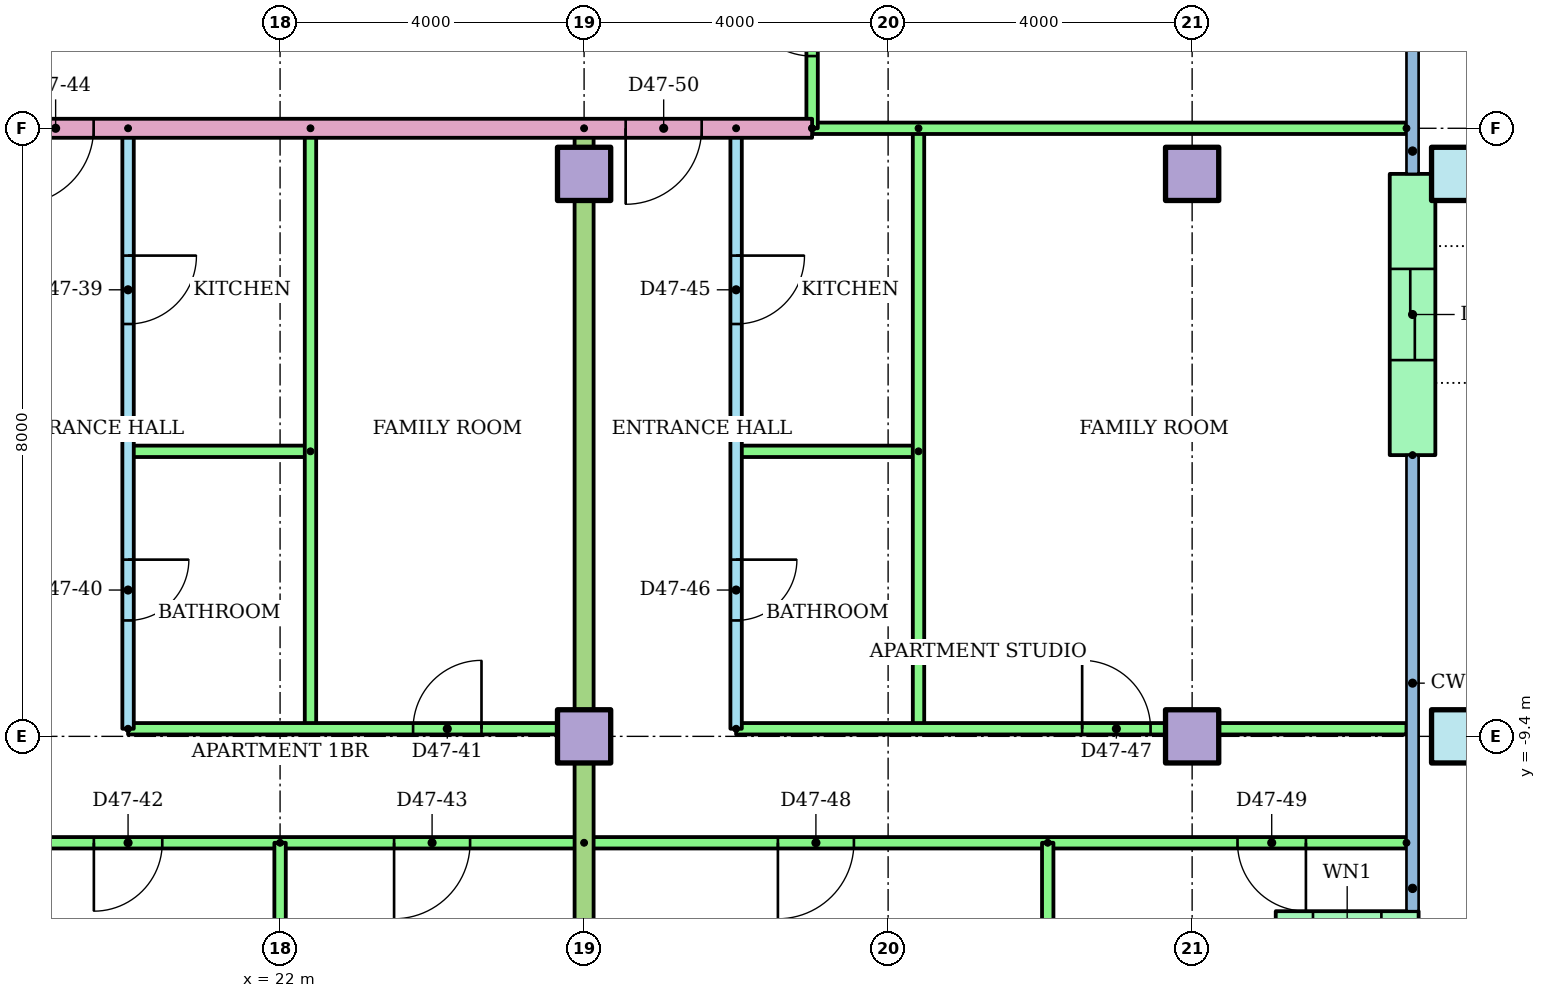
"""IFC4 building model, lengths in metres.
Left out: names, types, materials, properties, quantities, classifications, styles, units other than length and angle.
Written with IfcOpenShell. Run it as: python <this file> out.ifc"""

import sys

from ifc_helpers import new_model, si_unit, direction, frame, frame_2d, origin, origin_2d, place, context, subcontext, project, spatial, rectangle, hollow_rectangle, extrude, element, fill, save


model = new_model("IFC4")
c1 = context("Model", 3, precision=1e-05, world=origin(), true_north=direction((0.0, 1.0)))
c2 = subcontext(c1, "Body", "Model", "MODEL_VIEW")
j1 = project(units=[si_unit("LENGTHUNIT", "METRE"), si_unit("PLANEANGLEUNIT", "RADIAN")], contexts=[c1])
p1 = place(None, origin())
s1 = spatial("IfcSite", under=j1, at=p1, CompositionType="ELEMENT")
p2 = place(p1, origin())
s2 = spatial("IfcBuilding", under=s1, at=p2, CompositionType="ELEMENT")
p3 = place(p2, frame((0.0, 0.0, 181.3)))
s3 = spatial("IfcBuildingStorey", under=s2, at=p3, CompositionType="ELEMENT", Elevation=181.3)
for number, where in (
    (1, (26.0, -9.4, 0.0)),
    (2, (34.0, -9.4, 0.0)),
):
    element("IfcColumn", number, at=place(p3, frame(where)), inside=s3, PredefinedType="COLUMN", context=c2, shape_type="SweptSolid", body=[
        extrude(rectangle(XDim=0.7, YDim=0.7, at=origin_2d()), origin(), (0.0, 0.0, 1.0), 3.2),
    ])
p4 = place(p3, frame((37.5, -9.4, 0.0)))
e3 = element("IfcColumn", 3, at=p4, inside=s3, PredefinedType="COLUMN", context=c2, shape_type="SweptSolid", body=[
    extrude(hollow_rectangle(XDim=0.7, YDim=0.7, WallThickness=0.036, at=origin_2d()), origin(), (0.0, 0.0, 1.0), 3.2),
])
for number, where in (
    (4, (26.0, -2.0, 0.0)),
    (5, (34.0, -2.0, 0.0)),
):
    element("IfcColumn", number, at=place(p3, frame(where)), inside=s3, PredefinedType="COLUMN", context=c2, shape_type="SweptSolid", body=[
        extrude(rectangle(XDim=0.7, YDim=0.7, at=origin_2d()), origin(), (0.0, 0.0, 1.0), 3.2),
    ])
p5 = place(p3, frame((37.5, -2.0, 0.0)))
e6 = element("IfcColumn", 6, at=p5, inside=s3, PredefinedType="COLUMN", context=c2, shape_type="SweptSolid", body=[
    extrude(hollow_rectangle(XDim=0.7, YDim=0.7, WallThickness=0.036, at=origin_2d()), origin(), (0.0, 0.0, 1.0), 3.2),
])
p6 = place(p3, frame((35.1, -12.0, 0.0)))
e7 = element("IfcWall", 7, at=p6, inside=s3, PredefinedType="STANDARD", context=c2, shape_type="SweptSolid", body=[
    extrude(rectangle(XDim=1.88, YDim=0.6, at=frame_2d((0.94, 0.0))), origin(), (0.0, 0.0, 1.0), 2.92),
])
p7 = place(p6, frame((0.49, 0.0, 0.9)))
e8 = element("IfcOpeningElement", 8, at=p7, cuts=e7, PredefinedType="OPENING", context=c2, shape_type="SweptSolid", body=[
    extrude(rectangle(XDim=0.9, YDim=1.5, at=frame_2d((0.45, 0.75))), frame((0.0, 0.31, 0.0), z_axis=(0.0, -1.0, 0.0), x_axis=(1.0, 0.0, 0.0)), (0.0, 0.0, 1.0), 0.62),
])
p8 = place(p3, frame((36.9, -5.7, 0.0), z_axis=(0.0, 0.0, 1.0), x_axis=(0.0, 1.0, 0.0)))
e9 = element("IfcWall", 9, at=p8, inside=s3, PredefinedType="STANDARD", context=c2, shape_type="SweptSolid", body=[
    extrude(rectangle(XDim=3.7, YDim=0.6, at=frame_2d((1.85, 0.0))), origin(), (0.0, 0.0, 1.0), 2.92),
])
p9 = place(p8, frame((1.25, 0.0, 0.0)))
e10 = element("IfcOpeningElement", 10, at=p9, cuts=e9, PredefinedType="OPENING", context=c2, shape_type="SweptSolid", body=[
    extrude(rectangle(XDim=1.2, YDim=2.1, at=frame_2d((0.6, 1.05))), frame((0.0, 0.31, 0.0), z_axis=(0.0, -1.0, 0.0), x_axis=(1.0, 0.0, 0.0)), (0.0, 0.0, 1.0), 0.62),
])
p10 = place(p3, frame((20.0, -1.4, 0.0), z_axis=(0.0, 0.0, 1.0), x_axis=(0.0, -1.0, 0.0)))
e11 = element("IfcWall", 11, at=p10, inside=s3, PredefinedType="PARTITIONING", context=c2, shape_type="SweptSolid", body=[
    extrude(rectangle(XDim=7.9, YDim=0.15, at=frame_2d((3.95, 0.0))), origin(), (0.0, 0.0, 1.0), 2.4),
])
p11 = place(p10, frame((1.675, 0.0, 0.0)))
e12 = element("IfcOpeningElement", 12, at=p11, cuts=e11, PredefinedType="OPENING", context=c2, shape_type="SweptSolid", body=[
    extrude(rectangle(XDim=0.9, YDim=2.1, at=frame_2d((0.45, 1.05))), frame((0.0, 0.085, 0.0), z_axis=(0.0, -1.0, 0.0), x_axis=(1.0, 0.0, 0.0)), (0.0, 0.0, 1.0), 0.17),
])
p12 = place(p10, frame((5.675, 0.0, 0.0)))
e13 = element("IfcOpeningElement", 13, at=p12, cuts=e11, PredefinedType="OPENING", context=c2, shape_type="SweptSolid", body=[
    extrude(rectangle(XDim=0.8, YDim=2.1, at=frame_2d((0.4, 1.05))), frame((0.0, 0.085, 0.0), z_axis=(0.0, -1.0, 0.0), x_axis=(1.0, 0.0, 0.0)), (0.0, 0.0, 1.0), 0.17),
])
p13 = place(p3, frame((22.4, -5.65, 0.0), z_axis=(0.0, 0.0, 1.0), x_axis=(-1.0, 0.0, 0.0)))
e14 = element("IfcWall", 14, at=p13, inside=s3, PredefinedType="PARTITIONING", context=c2, shape_type="SweptSolid", body=[
    extrude(rectangle(XDim=2.4, YDim=0.15, at=frame_2d((1.2, 0.0))), origin(), (0.0, 0.0, 1.0), 2.4),
])
p14 = place(p3, frame((22.4, -1.4, 0.0), z_axis=(0.0, 0.0, 1.0), x_axis=(0.0, -1.0, 0.0)))
e15 = element("IfcWall", 15, at=p14, inside=s3, PredefinedType="PARTITIONING", context=c2, shape_type="SweptSolid", body=[
    extrude(rectangle(XDim=7.9, YDim=0.15, at=frame_2d((3.95, 0.0))), origin(), (0.0, 0.0, 1.0), 2.4),
])
p15 = place(p3, frame((20.0, -9.3, 0.0)))
e16 = element("IfcWall", 16, at=p15, inside=s3, PredefinedType="PARTITIONING", context=c2, shape_type="SweptSolid", body=[
    extrude(rectangle(XDim=6.0, YDim=0.15, at=frame_2d((3.0, 0.0))), origin(), (0.0, 0.0, 1.0), 2.4),
])
p16 = place(p15, frame((3.75, 0.0, 0.0)))
e17 = element("IfcOpeningElement", 17, at=p16, cuts=e16, PredefinedType="OPENING", context=c2, shape_type="SweptSolid", body=[
    extrude(rectangle(XDim=0.9, YDim=2.1, at=frame_2d((0.45, 1.05))), frame((0.0, 0.085, 0.0), z_axis=(0.0, -1.0, 0.0), x_axis=(1.0, 0.0, 0.0)), (0.0, 0.0, 1.0), 0.17),
])
p17 = place(p3, frame((26.0, -10.8, 0.0), z_axis=(0.0, 0.0, 1.0), x_axis=(-1.0, 0.0, 0.0)))
e18 = element("IfcWall", 18, at=p17, inside=s3, PredefinedType="PARTITIONING", context=c2, shape_type="SweptSolid", body=[
    extrude(rectangle(XDim=8.0, YDim=0.15, at=frame_2d((4.0, 0.0))), origin(), (0.0, 0.0, 1.0), 2.4),
])
p18 = place(p17, frame((5.55, 0.0, 0.0)))
e19 = element("IfcOpeningElement", 19, at=p18, cuts=e18, PredefinedType="OPENING", context=c2, shape_type="SweptSolid", body=[
    extrude(rectangle(XDim=0.9, YDim=2.1, at=frame_2d((0.45, 1.05))), frame((0.0, 0.085, 0.0), z_axis=(0.0, -1.0, 0.0), x_axis=(1.0, 0.0, 0.0)), (0.0, 0.0, 1.0), 0.17),
])
p19 = place(p17, frame((1.5, 0.0, 0.0)))
e20 = element("IfcOpeningElement", 20, at=p19, cuts=e18, PredefinedType="OPENING", context=c2, shape_type="SweptSolid", body=[
    extrude(rectangle(XDim=1.0, YDim=2.1, at=frame_2d((0.5, 1.05))), frame((0.0, 0.085, 0.0), z_axis=(0.0, -1.0, 0.0), x_axis=(1.0, 0.0, 0.0)), (0.0, 0.0, 1.0), 0.17),
])
p20 = place(p3, frame((22.0, -10.8, 0.0), z_axis=(0.0, 0.0, 1.0), x_axis=(0.0, -1.0, 0.0)))
e21 = element("IfcWall", 21, at=p20, inside=s3, PredefinedType="PARTITIONING", context=c2, shape_type="SweptSolid", body=[
    extrude(rectangle(XDim=5.621, YDim=0.15, at=frame_2d((2.811, 0.0))), origin(), (0.0, 0.0, 1.0), 2.4),
])
p21 = place(p3, frame((28.0, -1.4, 0.0), z_axis=(0.0, 0.0, 1.0), x_axis=(0.0, -1.0, 0.0)))
e22 = element("IfcWall", 22, at=p21, inside=s3, PredefinedType="PARTITIONING", context=c2, shape_type="SweptSolid", body=[
    extrude(rectangle(XDim=7.9, YDim=0.15, at=frame_2d((3.95, 0.0))), origin(), (0.0, 0.0, 1.0), 2.4),
])
p22 = place(p21, frame((1.675, 0.0, 0.0)))
e23 = element("IfcOpeningElement", 23, at=p22, cuts=e22, PredefinedType="OPENING", context=c2, shape_type="SweptSolid", body=[
    extrude(rectangle(XDim=0.9, YDim=2.1, at=frame_2d((0.45, 1.05))), frame((0.0, 0.085, 0.0), z_axis=(0.0, -1.0, 0.0), x_axis=(1.0, 0.0, 0.0)), (0.0, 0.0, 1.0), 0.17),
])
p23 = place(p21, frame((5.675, 0.0, 0.0)))
e24 = element("IfcOpeningElement", 24, at=p23, cuts=e22, PredefinedType="OPENING", context=c2, shape_type="SweptSolid", body=[
    extrude(rectangle(XDim=0.8, YDim=2.1, at=frame_2d((0.4, 1.05))), frame((0.0, 0.085, 0.0), z_axis=(0.0, -1.0, 0.0), x_axis=(1.0, 0.0, 0.0)), (0.0, 0.0, 1.0), 0.17),
])
p24 = place(p3, frame((30.4, -5.65, 0.0), z_axis=(0.0, 0.0, 1.0), x_axis=(-1.0, 0.0, 0.0)))
e25 = element("IfcWall", 25, at=p24, inside=s3, PredefinedType="PARTITIONING", context=c2, shape_type="SweptSolid", body=[
    extrude(rectangle(XDim=2.4, YDim=0.15, at=frame_2d((1.2, 0.0))), origin(), (0.0, 0.0, 1.0), 2.4),
])
p25 = place(p3, frame((30.4, -1.4, 0.0), z_axis=(0.0, 0.0, 1.0), x_axis=(0.0, -1.0, 0.0)))
e26 = element("IfcWall", 26, at=p25, inside=s3, PredefinedType="PARTITIONING", context=c2, shape_type="SweptSolid", body=[
    extrude(rectangle(XDim=7.9, YDim=0.15, at=frame_2d((3.95, 0.0))), origin(), (0.0, 0.0, 1.0), 2.4),
])
p26 = place(p3, frame((28.0, -9.3, 0.0)))
e27 = element("IfcWall", 27, at=p26, inside=s3, PredefinedType="PARTITIONING", context=c2, shape_type="SweptSolid", body=[
    extrude(rectangle(XDim=8.82, YDim=0.15, at=frame_2d((4.41, 0.0))), origin(), (0.0, 0.0, 1.0), 2.4),
])
p27 = place(p26, frame((4.553, 0.0, 0.0)))
e28 = element("IfcOpeningElement", 28, at=p27, cuts=e27, PredefinedType="OPENING", context=c2, shape_type="SweptSolid", body=[
    extrude(rectangle(XDim=0.9, YDim=2.1, at=frame_2d((0.45, 1.05))), frame((0.0, 0.085, 0.0), z_axis=(0.0, -1.0, 0.0), x_axis=(1.0, 0.0, 0.0)), (0.0, 0.0, 1.0), 0.17),
])
p28 = place(p3, frame((36.82, -10.8, 0.0), z_axis=(0.0, 0.0, 1.0), x_axis=(-1.0, 0.0, 0.0)))
e29 = element("IfcWall", 29, at=p28, inside=s3, PredefinedType="PARTITIONING", context=c2, shape_type="SweptSolid", body=[
    extrude(rectangle(XDim=10.82, YDim=0.15, at=frame_2d((5.41, 0.0))), origin(), (0.0, 0.0, 1.0), 2.4),
])
p29 = place(p28, frame((7.27, 0.0, 0.0)))
e30 = element("IfcOpeningElement", 30, at=p29, cuts=e29, PredefinedType="OPENING", context=c2, shape_type="SweptSolid", body=[
    extrude(rectangle(XDim=1.0, YDim=2.1, at=frame_2d((0.5, 1.05))), frame((0.0, 0.085, 0.0), z_axis=(0.0, -1.0, 0.0), x_axis=(1.0, 0.0, 0.0)), (0.0, 0.0, 1.0), 0.17),
])
p30 = place(p28, frame((1.323, 0.0, 0.0)))
e31 = element("IfcOpeningElement", 31, at=p30, cuts=e29, PredefinedType="OPENING", context=c2, shape_type="SweptSolid", body=[
    extrude(rectangle(XDim=0.9, YDim=2.1, at=frame_2d((0.45, 1.05))), frame((0.0, 0.085, 0.0), z_axis=(0.0, -1.0, 0.0), x_axis=(1.0, 0.0, 0.0)), (0.0, 0.0, 1.0), 0.17),
])
p31 = place(p3, frame((32.1, -10.8, 0.0), z_axis=(0.0, 0.0, 1.0), x_axis=(0.0, -1.0, 0.0)))
e32 = element("IfcWall", 32, at=p31, inside=s3, PredefinedType="PARTITIONING", context=c2, shape_type="SweptSolid", body=[
    extrude(rectangle(XDim=3.82, YDim=0.15, at=frame_2d((1.91, 0.0))), origin(), (0.0, 0.0, 1.0), 2.4),
])
p32 = place(p3, frame((26.0, -1.4, 0.0), z_axis=(0.0, 0.0, 1.0), x_axis=(0.0, -1.0, 0.0)))
e33 = element("IfcWall", 33, at=p32, inside=s3, PredefinedType="PARTITIONING", context=c2, shape_type="SweptSolid", body=[
    extrude(rectangle(XDim=15.01, YDim=0.25, at=frame_2d((7.505, 0.0))), origin(), (0.0, 0.0, 1.0), 2.4),
])
p33 = place(p3, frame((29.0, -1.4, 0.0), z_axis=(0.0, 0.0, 1.0), x_axis=(-1.0, 0.0, 0.0)))
e34 = element("IfcWall", 34, at=p33, inside=s3, PredefinedType="PARTITIONING", context=c2, shape_type="SweptSolid", body=[
    extrude(rectangle(XDim=15.0, YDim=0.25, at=frame_2d((7.5, 0.0))), origin(), (0.0, 0.0, 1.0), 2.4),
])
p34 = place(p33, frame((9.453, 0.0, 0.0)))
e35 = element("IfcOpeningElement", 35, at=p34, cuts=e34, PredefinedType="OPENING", context=c2, shape_type="SweptSolid", body=[
    extrude(rectangle(XDim=1.0, YDim=2.1, at=frame_2d((0.5, 1.05))), frame((0.0, 0.135, 0.0), z_axis=(0.0, -1.0, 0.0), x_axis=(1.0, 0.0, 0.0)), (0.0, 0.0, 1.0), 0.27),
])
p35 = place(p33, frame((1.453, 0.0, 0.0)))
e36 = element("IfcOpeningElement", 36, at=p35, cuts=e34, PredefinedType="OPENING", context=c2, shape_type="SweptSolid", body=[
    extrude(rectangle(XDim=1.0, YDim=2.1, at=frame_2d((0.5, 1.05))), frame((0.0, 0.135, 0.0), z_axis=(0.0, -1.0, 0.0), x_axis=(1.0, 0.0, 0.0)), (0.0, 0.0, 1.0), 0.27),
])
p36 = place(p3, frame((36.82, -1.4, 0.0), z_axis=(0.0, 0.0, 1.0), x_axis=(-1.0, 0.0, 0.0)))
e37 = element("IfcWall", 37, at=p36, inside=s3, PredefinedType="PARTITIONING", context=c2, shape_type="SweptSolid", body=[
    extrude(rectangle(XDim=7.82, YDim=0.15, at=frame_2d((3.91, 0.0))), origin(), (0.0, 0.0, 1.0), 2.4),
])
p37 = place(p3, frame((29.0, -1.4, 0.0), z_axis=(0.0, 0.0, 1.0), x_axis=(0.0, 1.0, 0.0)))
e38 = element("IfcWall", 38, at=p37, inside=s3, PredefinedType="PARTITIONING", context=c2, shape_type="SweptSolid", body=[
    extrude(rectangle(XDim=2.8, YDim=0.15, at=frame_2d((1.4, 0.0))), origin(), (0.0, 0.0, 1.0), 2.4),
])
p38 = place(p37, frame((0.95, 0.0, 0.0)))
e39 = element("IfcOpeningElement", 39, at=p38, cuts=e38, PredefinedType="OPENING", context=c2, shape_type="SweptSolid", body=[
    extrude(rectangle(XDim=0.9, YDim=2.1, at=frame_2d((0.45, 1.05))), frame((0.0, 0.085, 0.0), z_axis=(0.0, -1.0, 0.0), x_axis=(1.0, 0.0, 0.0)), (0.0, 0.0, 1.0), 0.17),
])
p39 = place(p11, origin())
e40 = element("IfcDoor", 40, at=p39, inside=s3, OperationType="SINGLE_SWING_LEFT", PredefinedType="DOOR", context=c2, shape_type="SweptSolid", body=[
    extrude(rectangle(XDim=0.9, YDim=2.1, at=frame_2d((0.45, 1.05))), frame((0.0, 0.025, 0.0), z_axis=(0.0, -1.0, 0.0), x_axis=(1.0, 0.0, 0.0)), (0.0, 0.0, 1.0), 0.05),
])
fill(e12, e40)
p40 = place(p12, origin())
e41 = element("IfcDoor", 41, at=p40, inside=s3, OperationType="SINGLE_SWING_LEFT", PredefinedType="DOOR", context=c2, shape_type="SweptSolid", body=[
    extrude(rectangle(XDim=0.8, YDim=2.1, at=frame_2d((0.4, 1.05))), frame((0.0, 0.025, 0.0), z_axis=(0.0, -1.0, 0.0), x_axis=(1.0, 0.0, 0.0)), (0.0, 0.0, 1.0), 0.05),
])
fill(e13, e41)
p41 = place(p16, origin())
e42 = element("IfcDoor", 42, at=p41, inside=s3, OperationType="SINGLE_SWING_RIGHT", PredefinedType="DOOR", context=c2, shape_type="SweptSolid", body=[
    extrude(rectangle(XDim=0.9, YDim=2.1, at=frame_2d((0.45, 1.05))), frame((0.0, 0.025, 0.0), z_axis=(0.0, -1.0, 0.0), x_axis=(1.0, 0.0, 0.0)), (0.0, 0.0, 1.0), 0.05),
])
fill(e17, e42)
p42 = place(p18, origin())
e43 = element("IfcDoor", 43, at=p42, inside=s3, OperationType="SINGLE_SWING_RIGHT", PredefinedType="DOOR", context=c2, shape_type="SweptSolid", body=[
    extrude(rectangle(XDim=0.9, YDim=2.1, at=frame_2d((0.45, 1.05))), frame((0.0, 0.025, 0.0), z_axis=(0.0, -1.0, 0.0), x_axis=(1.0, 0.0, 0.0)), (0.0, 0.0, 1.0), 0.05),
])
fill(e19, e43)
p43 = place(p19, origin())
e44 = element("IfcDoor", 44, at=p43, inside=s3, OperationType="SINGLE_SWING_RIGHT", PredefinedType="DOOR", context=c2, shape_type="SweptSolid", body=[
    extrude(rectangle(XDim=1.0, YDim=2.1, at=frame_2d((0.5, 1.05))), frame((0.0, 0.025, 0.0), z_axis=(0.0, -1.0, 0.0), x_axis=(1.0, 0.0, 0.0)), (0.0, 0.0, 1.0), 0.05),
])
fill(e20, e44)
p44 = place(p34, origin())
e45 = element("IfcDoor", 45, at=p44, inside=s3, OperationType="SINGLE_SWING_RIGHT", PredefinedType="DOOR", context=c2, shape_type="SweptSolid", body=[
    extrude(rectangle(XDim=1.0, YDim=2.1, at=frame_2d((0.5, 1.05))), frame((0.0, 0.025, 0.0), z_axis=(0.0, -1.0, 0.0), x_axis=(1.0, 0.0, 0.0)), (0.0, 0.0, 1.0), 0.05),
])
fill(e35, e45)
p45 = place(p22, origin())
e46 = element("IfcDoor", 46, at=p45, inside=s3, OperationType="SINGLE_SWING_LEFT", PredefinedType="DOOR", context=c2, shape_type="SweptSolid", body=[
    extrude(rectangle(XDim=0.9, YDim=2.1, at=frame_2d((0.45, 1.05))), frame((0.0, 0.025, 0.0), z_axis=(0.0, -1.0, 0.0), x_axis=(1.0, 0.0, 0.0)), (0.0, 0.0, 1.0), 0.05),
])
fill(e23, e46)
p46 = place(p23, origin())
e47 = element("IfcDoor", 47, at=p46, inside=s3, OperationType="SINGLE_SWING_LEFT", PredefinedType="DOOR", context=c2, shape_type="SweptSolid", body=[
    extrude(rectangle(XDim=0.8, YDim=2.1, at=frame_2d((0.4, 1.05))), frame((0.0, 0.025, 0.0), z_axis=(0.0, -1.0, 0.0), x_axis=(1.0, 0.0, 0.0)), (0.0, 0.0, 1.0), 0.05),
])
fill(e24, e47)
p47 = place(p27, origin())
e48 = element("IfcDoor", 48, at=p47, inside=s3, OperationType="SINGLE_SWING_LEFT", PredefinedType="DOOR", context=c2, shape_type="SweptSolid", body=[
    extrude(rectangle(XDim=0.9, YDim=2.1, at=frame_2d((0.45, 1.05))), frame((0.0, 0.025, 0.0), z_axis=(0.0, -1.0, 0.0), x_axis=(1.0, 0.0, 0.0)), (0.0, 0.0, 1.0), 0.05),
])
fill(e28, e48)
p48 = place(p29, origin())
e49 = element("IfcDoor", 49, at=p48, inside=s3, OperationType="SINGLE_SWING_RIGHT", PredefinedType="DOOR", context=c2, shape_type="SweptSolid", body=[
    extrude(rectangle(XDim=1.0, YDim=2.1, at=frame_2d((0.5, 1.05))), frame((0.0, 0.025, 0.0), z_axis=(0.0, -1.0, 0.0), x_axis=(1.0, 0.0, 0.0)), (0.0, 0.0, 1.0), 0.05),
])
fill(e30, e49)
p49 = place(p30, origin())
e50 = element("IfcDoor", 50, at=p49, inside=s3, OperationType="SINGLE_SWING_LEFT", PredefinedType="DOOR", context=c2, shape_type="SweptSolid", body=[
    extrude(rectangle(XDim=0.9, YDim=2.1, at=frame_2d((0.45, 1.05))), frame((0.0, 0.025, 0.0), z_axis=(0.0, -1.0, 0.0), x_axis=(1.0, 0.0, 0.0)), (0.0, 0.0, 1.0), 0.05),
])
fill(e31, e50)
p50 = place(p35, origin())
e51 = element("IfcDoor", 51, at=p50, inside=s3, OperationType="SINGLE_SWING_RIGHT", PredefinedType="DOOR", context=c2, shape_type="SweptSolid", body=[
    extrude(rectangle(XDim=1.0, YDim=2.1, at=frame_2d((0.5, 1.05))), frame((0.0, 0.025, 0.0), z_axis=(0.0, -1.0, 0.0), x_axis=(1.0, 0.0, 0.0)), (0.0, 0.0, 1.0), 0.05),
])
fill(e36, e51)
p51 = place(p38, origin())
e52 = element("IfcDoor", 52, at=p51, inside=s3, OperationType="SINGLE_SWING_RIGHT", PredefinedType="DOOR", context=c2, shape_type="SweptSolid", body=[
    extrude(rectangle(XDim=0.9, YDim=2.1, at=frame_2d((0.45, 1.05))), frame((0.0, 0.025, 0.0), z_axis=(0.0, -1.0, 0.0), x_axis=(1.0, 0.0, 0.0)), (0.0, 0.0, 1.0), 0.05),
])
fill(e39, e52)
p52 = place(p9, origin())
e53 = element("IfcDoor", 53, at=p52, inside=s3, OperationType="SLIDING_TO_LEFT", PredefinedType="DOOR", context=c2, shape_type="SweptSolid", body=[
    extrude(rectangle(XDim=1.2, YDim=2.1, at=frame_2d((0.6, 1.05))), frame((0.0, 0.025, 0.0), z_axis=(0.0, -1.0, 0.0), x_axis=(1.0, 0.0, 0.0)), (0.0, 0.0, 1.0), 0.05),
])
fill(e10, e53)
save(model, sys.argv[1])
